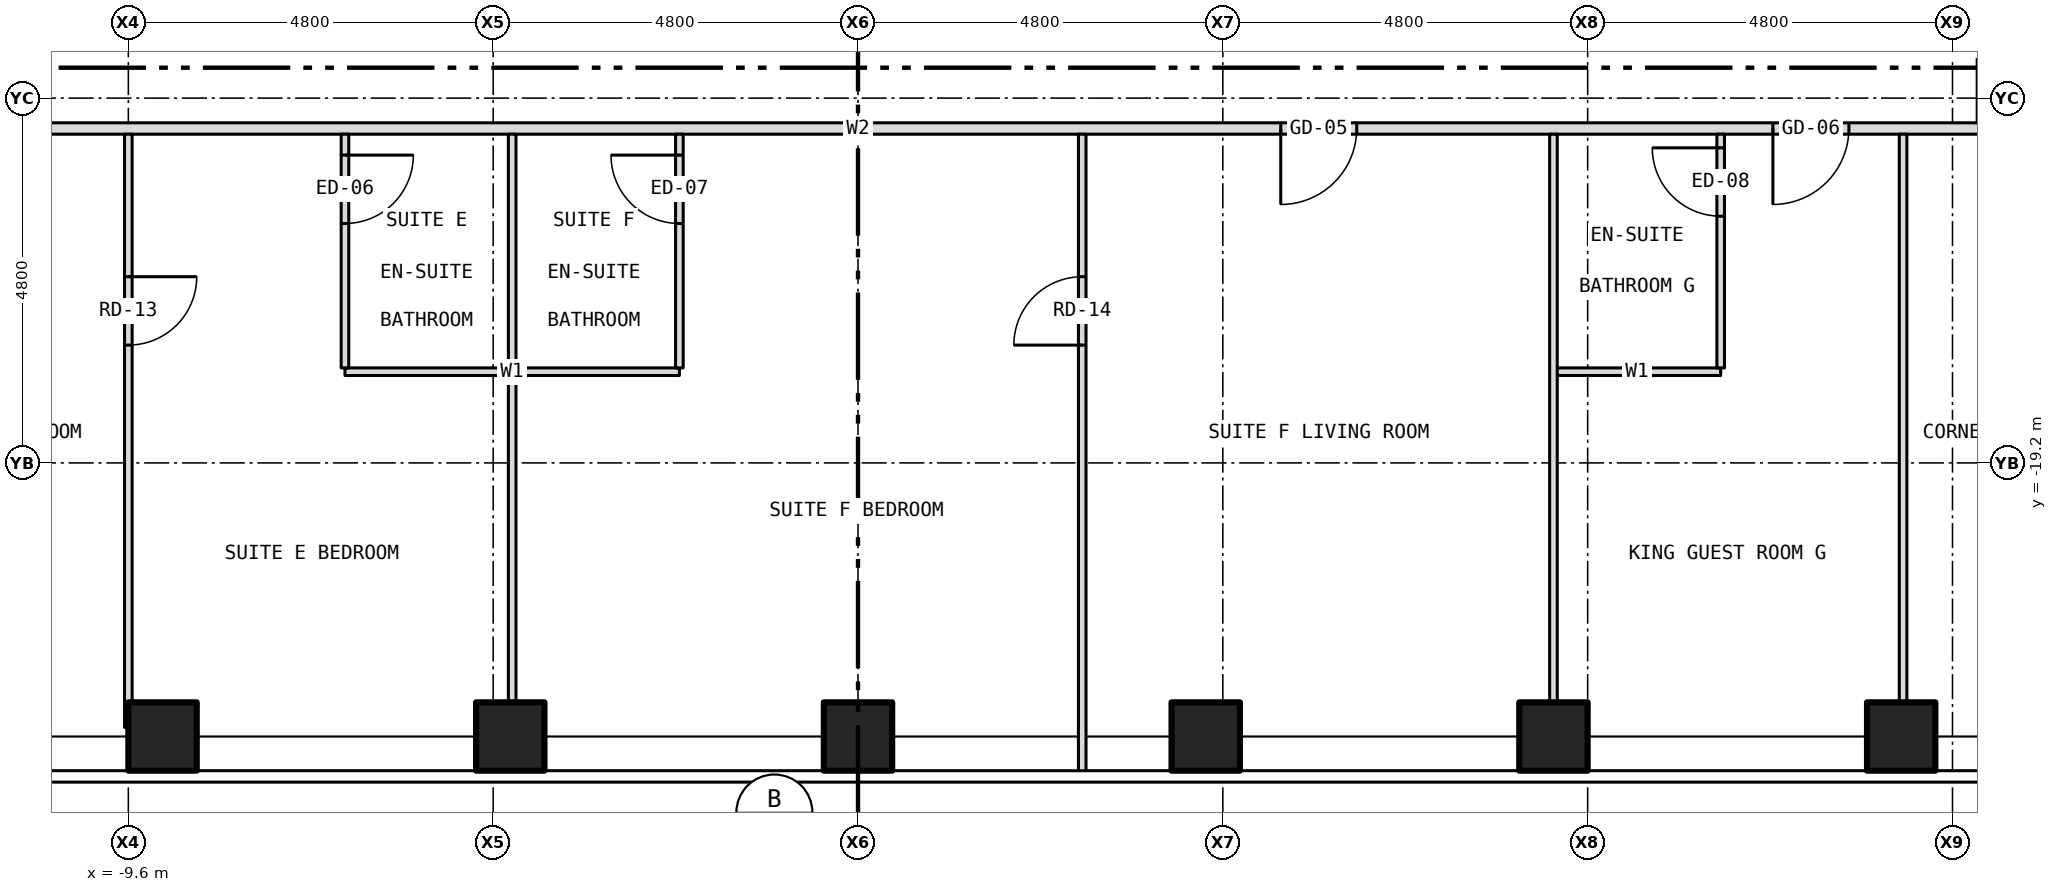
"""IFC4 building model, lengths in metres.
Left out: names, types, materials, properties, quantities, classifications, styles, units other than length and angle.
Written with IfcOpenShell. Run it as: python <this file> out.ifc"""

import sys

from ifc_helpers import new_model, si_unit, direction, frame, frame_2d, origin, origin_2d, place, context, subcontext, project, spatial, rectangle, hollow_rectangle, extrude, element, fill, save


model = new_model("IFC4")
c1 = context("Model", 3, precision=1e-05, world=origin(), true_north=direction((0.0, 1.0)))
c2 = subcontext(c1, "Body", "Model", "MODEL_VIEW")
j1 = project(units=[si_unit("LENGTHUNIT", "METRE"), si_unit("PLANEANGLEUNIT", "RADIAN")], contexts=[c1])
p1 = place(None, origin())
s1 = spatial("IfcSite", under=j1, at=p1, CompositionType="ELEMENT")
p2 = place(p1, origin())
s2 = spatial("IfcBuilding", under=s1, at=p2, CompositionType="ELEMENT")
p3 = place(p2, frame((0.0, 0.0, 110.0)))
s3 = spatial("IfcBuildingStorey", under=s2, at=p3, CompositionType="ELEMENT", Elevation=110.0)
for number, where, z_axis, x_axis in (
    (1, (-9.15, -22.8, -0.15), (0.0, 0.0, 1.0), (1.0, 0.0, 0.0)),
    (2, (-4.575, -22.8, -0.15), (0.0, 0.0, 1.0), (1.0, 0.0, 0.0)),
    (3, (0.0, -22.8, -0.15), (0.0, 0.0, 1.0), (1.0, 0.0, 0.0)),
    (4, (4.575, -22.8, -0.15), (0.0, 0.0, 1.0), (1.0, 0.0, 0.0)),
    (5, (9.15, -22.8, -0.15), (0.0, 0.0, 1.0), (1.0, 0.0, 0.0)),
    (6, (13.725, -22.8, -0.15), (0.0, 0.0, 1.0), (1.0, 0.0, 0.0)),
):
    element("IfcColumn", number, at=place(p3, frame(where, z_axis=z_axis, x_axis=x_axis)), inside=s3, PredefinedType="COLUMN", context=c2, shape_type="SweptSolid", body=[
        extrude(hollow_rectangle(XDim=0.9, YDim=0.9, WallThickness=0.05, at=origin_2d()), origin(), (0.0, 0.0, 1.0), 3.5),
    ])
p4 = place(p3, frame((-6.75, -18.0, 0.0), z_axis=(0.0, 0.0, 1.0), x_axis=(1.0, 0.0, 0.0)))
e7 = element("IfcWall", 7, at=p4, inside=s3, PredefinedType="PARTITIONING", context=c2, shape_type="SweptSolid", body=[
    extrude(rectangle(XDim=4.4, YDim=0.1, at=frame_2d((2.2, 0.0))), origin(), (0.0, 0.0, 1.0), 3.35),
])
p5 = place(p3, frame((9.15, -18.0, 0.0), z_axis=(0.0, 0.0, 1.0), x_axis=(1.0, 0.0, 0.0)))
e8 = element("IfcWall", 8, at=p5, inside=s3, PredefinedType="PARTITIONING", context=c2, shape_type="SweptSolid", body=[
    extrude(rectangle(XDim=2.2, YDim=0.1, at=frame_2d((1.1, 0.0))), origin(), (0.0, 0.0, 1.0), 3.35),
])
p6 = place(p3, frame((-14.8, -14.8, 0.0), z_axis=(0.0, 0.0, 1.0), x_axis=(1.0, 0.0, 0.0)))
e9 = element("IfcWall", 9, at=p6, inside=s3, PredefinedType="PARTITIONING", context=c2, shape_type="SweptSolid", body=[
    extrude(rectangle(XDim=29.6, YDim=0.15, at=frame_2d((14.8, 0.0))), origin(), (0.0, 0.0, 1.0), 3.35),
])
p7 = place(p6, frame((2.634, 0.0, 0.0)))
e10 = element("IfcOpeningElement", 10, at=p7, cuts=e9, PredefinedType="OPENING", context=c2, shape_type="SweptSolid", body=[
    extrude(rectangle(XDim=1.0, YDim=2.1, at=frame_2d((0.5, 1.05))), frame((0.0, 0.087, 0.0), z_axis=(0.0, -1.0, 0.0), x_axis=(1.0, 0.0, 0.0)), (0.0, 0.0, 1.0), 0.174),
])
p8 = place(p6, frame((20.362, 0.0, 0.0)))
e11 = element("IfcOpeningElement", 11, at=p8, cuts=e9, PredefinedType="OPENING", context=c2, shape_type="SweptSolid", body=[
    extrude(rectangle(XDim=1.0, YDim=2.1, at=frame_2d((0.5, 1.05))), frame((0.0, 0.087, 0.0), z_axis=(0.0, -1.0, 0.0), x_axis=(1.0, 0.0, 0.0)), (0.0, 0.0, 1.0), 0.174),
])
p9 = place(p6, frame((26.837, 0.0, 0.0)))
e12 = element("IfcOpeningElement", 12, at=p9, cuts=e9, PredefinedType="OPENING", context=c2, shape_type="SweptSolid", body=[
    extrude(rectangle(XDim=1.0, YDim=2.1, at=frame_2d((0.5, 1.05))), frame((0.0, 0.087, 0.0), z_axis=(0.0, -1.0, 0.0), x_axis=(1.0, 0.0, 0.0)), (0.0, 0.0, 1.0), 0.174),
])
p10 = place(p3, frame((-9.6, -22.68, 0.0), z_axis=(0.0, 0.0, 1.0), x_axis=(0.0, 1.0, 0.0)))
e13 = element("IfcWall", 13, at=p10, inside=s3, PredefinedType="PARTITIONING", context=c2, shape_type="SweptSolid", body=[
    extrude(rectangle(XDim=0.33, YDim=0.1, at=frame_2d((0.165, 0.0))), origin(), (0.0, 0.0, 1.0), 3.35),
])
p11 = place(p3, frame((-9.6, -22.35, 0.0), z_axis=(0.0, 0.0, 1.0), x_axis=(0.0, 1.0, 0.0)))
e14 = element("IfcWall", 14, at=p11, inside=s3, PredefinedType="PARTITIONING", context=c2, shape_type="SweptSolid", body=[
    extrude(rectangle(XDim=7.475, YDim=0.1, at=frame_2d((3.738, 0.0))), origin(), (0.0, 0.0, 1.0), 2.728),
])
p12 = place(p11, frame((4.7, 0.0, 0.0)))
e15 = element("IfcOpeningElement", 15, at=p12, cuts=e14, PredefinedType="OPENING", context=c2, shape_type="SweptSolid", body=[
    extrude(rectangle(XDim=0.9, YDim=2.1, at=frame_2d((0.45, 1.05))), frame((0.0, 0.062, 0.0), z_axis=(0.0, -1.0, 0.0), x_axis=(1.0, 0.0, 0.0)), (0.0, 0.0, 1.0), 0.124),
])
p13 = place(p3, frame((-6.75, -17.95, 0.0), z_axis=(0.0, 0.0, 1.0), x_axis=(0.0, 1.0, 0.0)))
e16 = element("IfcWall", 16, at=p13, inside=s3, PredefinedType="PARTITIONING", context=c2, shape_type="SweptSolid", body=[
    extrude(rectangle(XDim=3.075, YDim=0.1, at=frame_2d((1.538, 0.0))), origin(), (0.0, 0.0, 1.0), 3.35),
])
p14 = place(p13, frame((1.9, 0.0, 0.0)))
e17 = element("IfcOpeningElement", 17, at=p14, cuts=e16, PredefinedType="OPENING", context=c2, shape_type="SweptSolid", body=[
    extrude(rectangle(XDim=0.9, YDim=2.1, at=frame_2d((0.45, 1.05))), frame((0.0, 0.062, 0.0), z_axis=(0.0, -1.0, 0.0), x_axis=(1.0, 0.0, 0.0)), (0.0, 0.0, 1.0), 0.124),
])
p15 = place(p3, frame((-4.55, -22.68, 0.0), z_axis=(0.0, 0.0, 1.0), x_axis=(0.0, 1.0, 0.0)))
e18 = element("IfcWall", 18, at=p15, inside=s3, PredefinedType="PARTITIONING", context=c2, shape_type="SweptSolid", body=[
    extrude(rectangle(XDim=4.63, YDim=0.1, at=frame_2d((2.315, 0.0))), origin(), (0.0, 0.0, 1.0), 3.35),
])
p16 = place(p3, frame((-4.55, -17.95, 0.0), z_axis=(0.0, 0.0, 1.0), x_axis=(0.0, 1.0, 0.0)))
e19 = element("IfcWall", 19, at=p16, inside=s3, PredefinedType="PARTITIONING", context=c2, shape_type="SweptSolid", body=[
    extrude(rectangle(XDim=3.075, YDim=0.1, at=frame_2d((1.538, 0.0))), origin(), (0.0, 0.0, 1.0), 3.35),
])
p17 = place(p3, frame((-2.35, -17.95, 0.0), z_axis=(0.0, 0.0, 1.0), x_axis=(0.0, 1.0, 0.0)))
e20 = element("IfcWall", 20, at=p17, inside=s3, PredefinedType="PARTITIONING", context=c2, shape_type="SweptSolid", body=[
    extrude(rectangle(XDim=3.075, YDim=0.1, at=frame_2d((1.538, 0.0))), origin(), (0.0, 0.0, 1.0), 3.35),
])
p18 = place(p17, frame((1.9, 0.0, 0.0)))
e21 = element("IfcOpeningElement", 21, at=p18, cuts=e20, PredefinedType="OPENING", context=c2, shape_type="SweptSolid", body=[
    extrude(rectangle(XDim=0.9, YDim=2.1, at=frame_2d((0.45, 1.05))), frame((0.0, 0.062, 0.0), z_axis=(0.0, -1.0, 0.0), x_axis=(1.0, 0.0, 0.0)), (0.0, 0.0, 1.0), 0.124),
])
p19 = place(p3, frame((2.95, -23.28, 0.0), z_axis=(0.0, 0.0, 1.0), x_axis=(0.0, 1.0, 0.0)))
e22 = element("IfcWall", 22, at=p19, inside=s3, PredefinedType="PARTITIONING", context=c2, shape_type="SweptSolid", body=[
    extrude(rectangle(XDim=8.405, YDim=0.1, at=frame_2d((4.203, 0.0))), origin(), (0.0, 0.0, 1.0), 3.35),
])
p20 = place(p19, frame((5.63, 0.0, 0.0)))
e23 = element("IfcOpeningElement", 23, at=p20, cuts=e22, PredefinedType="OPENING", context=c2, shape_type="SweptSolid", body=[
    extrude(rectangle(XDim=0.9, YDim=2.1, at=frame_2d((0.45, 1.05))), frame((0.0, 0.062, 0.0), z_axis=(0.0, -1.0, 0.0), x_axis=(1.0, 0.0, 0.0)), (0.0, 0.0, 1.0), 0.124),
])
p21 = place(p3, frame((9.15, -22.68, 0.0), z_axis=(0.0, 0.0, 1.0), x_axis=(0.0, 1.0, 0.0)))
e24 = element("IfcWall", 24, at=p21, inside=s3, PredefinedType="PARTITIONING", context=c2, shape_type="SweptSolid", body=[
    extrude(rectangle(XDim=7.805, YDim=0.1, at=frame_2d((3.902, 0.0))), origin(), (0.0, 0.0, 1.0), 3.35),
])
p22 = place(p3, frame((11.35, -17.95, 0.0), z_axis=(0.0, 0.0, 1.0), x_axis=(0.0, 1.0, 0.0)))
e25 = element("IfcWall", 25, at=p22, inside=s3, PredefinedType="PARTITIONING", context=c2, shape_type="SweptSolid", body=[
    extrude(rectangle(XDim=3.075, YDim=0.1, at=frame_2d((1.538, 0.0))), origin(), (0.0, 0.0, 1.0), 3.35),
])
p23 = place(p22, frame((1.996, 0.0, 0.0)))
e26 = element("IfcOpeningElement", 26, at=p23, cuts=e25, PredefinedType="OPENING", context=c2, shape_type="SweptSolid", body=[
    extrude(rectangle(XDim=0.9, YDim=2.1, at=frame_2d((0.45, 1.05))), frame((0.0, 0.062, 0.0), z_axis=(0.0, -1.0, 0.0), x_axis=(1.0, 0.0, 0.0)), (0.0, 0.0, 1.0), 0.124),
])
p24 = place(p3, frame((13.75, -22.68, 0.0), z_axis=(0.0, 0.0, 1.0), x_axis=(0.0, 1.0, 0.0)))
e27 = element("IfcWall", 27, at=p24, inside=s3, PredefinedType="PARTITIONING", context=c2, shape_type="SweptSolid", body=[
    extrude(rectangle(XDim=7.805, YDim=0.1, at=frame_2d((3.902, 0.0))), origin(), (0.0, 0.0, 1.0), 3.35),
])
p25 = place(p12, origin())
e28 = element("IfcDoor", 28, at=p25, inside=s3, OperationType="SINGLE_SWING_RIGHT", PredefinedType="DOOR", context=c2, shape_type="SweptSolid", body=[
    extrude(rectangle(XDim=0.9, YDim=2.1, at=frame_2d((0.45, 1.05))), frame((0.0, 0.025, 0.0), z_axis=(0.0, -1.0, 0.0), x_axis=(1.0, 0.0, 0.0)), (0.0, 0.0, 1.0), 0.05),
])
fill(e15, e28)
p26 = place(p14, origin())
e29 = element("IfcDoor", 29, at=p26, inside=s3, OperationType="SINGLE_SWING_RIGHT", PredefinedType="DOOR", context=c2, shape_type="SweptSolid", body=[
    extrude(rectangle(XDim=0.9, YDim=2.1, at=frame_2d((0.45, 1.05))), frame((0.0, 0.025, 0.0), z_axis=(0.0, -1.0, 0.0), x_axis=(1.0, 0.0, 0.0)), (0.0, 0.0, 1.0), 0.05),
])
fill(e17, e29)
p27 = place(p8, origin())
e30 = element("IfcDoor", 30, at=p27, inside=s3, OperationType="SINGLE_SWING_LEFT", PredefinedType="DOOR", context=c2, shape_type="SweptSolid", body=[
    extrude(rectangle(XDim=1.0, YDim=2.1, at=frame_2d((0.5, 1.05))), frame((0.0, 0.025, 0.0), z_axis=(0.0, -1.0, 0.0), x_axis=(1.0, 0.0, 0.0)), (0.0, 0.0, 1.0), 0.05),
])
fill(e11, e30)
p28 = place(p20, origin())
e31 = element("IfcDoor", 31, at=p28, inside=s3, OperationType="SINGLE_SWING_LEFT", PredefinedType="DOOR", context=c2, shape_type="SweptSolid", body=[
    extrude(rectangle(XDim=0.9, YDim=2.1, at=frame_2d((0.45, 1.05))), frame((0.0, 0.025, 0.0), z_axis=(0.0, -1.0, 0.0), x_axis=(1.0, 0.0, 0.0)), (0.0, 0.0, 1.0), 0.05),
])
fill(e23, e31)
p29 = place(p18, origin())
e32 = element("IfcDoor", 32, at=p29, inside=s3, OperationType="SINGLE_SWING_RIGHT", PredefinedType="DOOR", context=c2, shape_type="SweptSolid", body=[
    extrude(rectangle(XDim=0.9, YDim=2.1, at=frame_2d((0.45, 1.05))), frame((0.0, 0.025, 0.0), z_axis=(0.0, -1.0, 0.0), x_axis=(1.0, 0.0, 0.0)), (0.0, 0.0, 1.0), 0.05),
])
fill(e21, e32)
p30 = place(p9, origin())
e33 = element("IfcDoor", 33, at=p30, inside=s3, OperationType="SINGLE_SWING_LEFT", PredefinedType="DOOR", context=c2, shape_type="SweptSolid", body=[
    extrude(rectangle(XDim=1.0, YDim=2.1, at=frame_2d((0.5, 1.05))), frame((0.0, 0.025, 0.0), z_axis=(0.0, -1.0, 0.0), x_axis=(1.0, 0.0, 0.0)), (0.0, 0.0, 1.0), 0.05),
])
fill(e12, e33)
p31 = place(p23, origin())
e34 = element("IfcDoor", 34, at=p31, inside=s3, OperationType="SINGLE_SWING_RIGHT", PredefinedType="DOOR", context=c2, shape_type="SweptSolid", body=[
    extrude(rectangle(XDim=0.9, YDim=2.1, at=frame_2d((0.45, 1.05))), frame((0.0, 0.025, 0.0), z_axis=(0.0, -1.0, 0.0), x_axis=(1.0, 0.0, 0.0)), (0.0, 0.0, 1.0), 0.05),
])
fill(e26, e34)
save(model, sys.argv[1])
